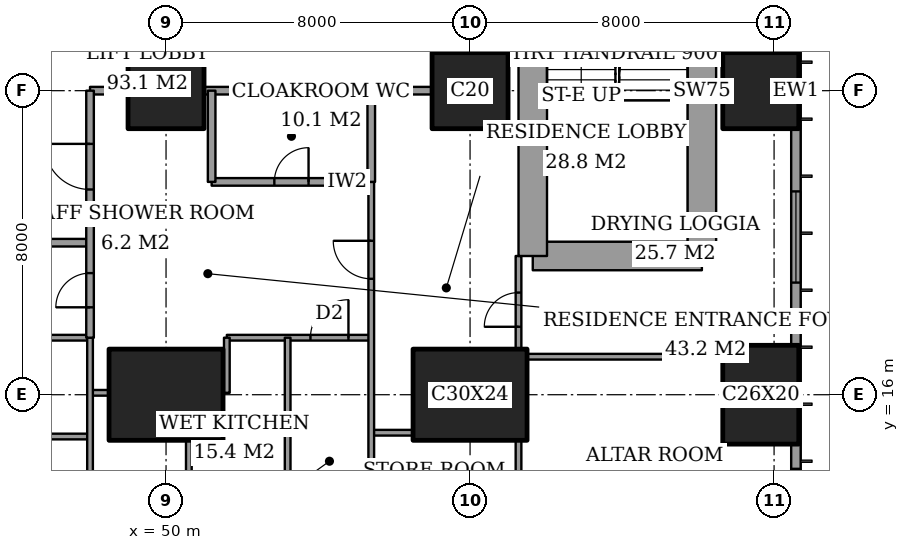
"""IFC4 building model, lengths in metres.
Left out: names, types, materials, properties, quantities, classifications, styles, units other than length and angle.
Written with IfcOpenShell. Run it as: python <this file> out.ifc"""

import sys

from ifc_helpers import new_model, si_unit, direction, frame, frame_2d, origin, origin_2d, place, context, subcontext, project, spatial, rectangle, extrude, element, fill, save


model = new_model("IFC4")
c1 = context("Model", 3, precision=1e-05, world=origin(), true_north=direction((0.0, 1.0)))
c2 = subcontext(c1, "Body", "Model", "MODEL_VIEW")
j1 = project(units=[si_unit("LENGTHUNIT", "METRE"), si_unit("PLANEANGLEUNIT", "RADIAN")], contexts=[c1])
p1 = place(None, origin())
s1 = spatial("IfcSite", under=j1, at=p1, CompositionType="ELEMENT")
p2 = place(p1, origin())
s2 = spatial("IfcBuilding", under=s1, at=p2, CompositionType="ELEMENT")
p3 = place(p2, frame((0.0, 0.0, 157.4)))
s3 = spatial("IfcBuildingStorey", under=s2, at=p3, CompositionType="ELEMENT", Elevation=157.4)
p4 = place(p3, frame((50.0, 16.0, 0.0), z_axis=(0.0, 0.0, 1.0), x_axis=(1.0, 0.0, 0.0)))
e1 = element("IfcColumn", 1, at=p4, inside=s3, PredefinedType="COLUMN", context=c2, shape_type="SweptSolid", body=[
    extrude(rectangle(XDim=3.0, YDim=2.4, at=origin_2d()), origin(), (0.0, 0.0, 1.0), 3.6),
])
p5 = place(p3, frame((50.0, 24.0, 0.0), z_axis=(0.0, 0.0, 1.0), x_axis=(1.0, 0.0, 0.0)))
e2 = element("IfcColumn", 2, at=p5, inside=s3, PredefinedType="COLUMN", context=c2, shape_type="SweptSolid", body=[
    extrude(rectangle(XDim=2.0, YDim=2.0, at=origin_2d()), origin(), (0.0, 0.0, 1.0), 3.6),
])
p6 = place(p3, frame((58.0, 16.0, 0.0), z_axis=(0.0, 0.0, 1.0), x_axis=(1.0, 0.0, 0.0)))
e3 = element("IfcColumn", 3, at=p6, inside=s3, PredefinedType="COLUMN", context=c2, shape_type="SweptSolid", body=[
    extrude(rectangle(XDim=3.0, YDim=2.4, at=origin_2d()), origin(), (0.0, 0.0, 1.0), 3.6),
])
p7 = place(p3, frame((58.0, 24.0, 0.0), z_axis=(0.0, 0.0, 1.0), x_axis=(1.0, 0.0, 0.0)))
e4 = element("IfcColumn", 4, at=p7, inside=s3, PredefinedType="COLUMN", context=c2, shape_type="SweptSolid", body=[
    extrude(rectangle(XDim=2.0, YDim=2.0, at=origin_2d()), origin(), (0.0, 0.0, 1.0), 3.6),
])
p8 = place(p3, frame((65.65, 16.0, 0.0), z_axis=(0.0, 0.0, 1.0), x_axis=(0.0, 1.0, 0.0)))
e5 = element("IfcColumn", 5, at=p8, inside=s3, PredefinedType="COLUMN", context=c2, shape_type="SweptSolid", body=[
    extrude(rectangle(XDim=2.6, YDim=2.0, at=origin_2d()), origin(), (0.0, 0.0, 1.0), 3.6),
])
p9 = place(p3, frame((65.65, 24.0, 0.0), z_axis=(0.0, 0.0, 1.0), x_axis=(1.0, 0.0, 0.0)))
e6 = element("IfcColumn", 6, at=p9, inside=s3, PredefinedType="COLUMN", context=c2, shape_type="SweptSolid", body=[
    extrude(rectangle(XDim=2.0, YDim=2.0, at=origin_2d()), origin(), (0.0, 0.0, 1.0), 3.6),
])
p10 = place(p3, frame((59.65, 19.65, 0.0), z_axis=(0.0, 0.0, 1.0), x_axis=(1.0, 0.0, 0.0)))
e7 = element("IfcWall", 7, at=p10, inside=s3, PredefinedType="SHEAR", context=c2, shape_type="SweptSolid", body=[
    extrude(rectangle(XDim=4.45, YDim=0.75, at=frame_2d((2.225, 0.0))), origin(), (0.0, 0.0, 1.0), 3.6),
])
p11 = place(p3, frame((64.1, 19.65, 0.0), z_axis=(0.0, 0.0, 1.0), x_axis=(0.0, 1.0, 0.0)))
e8 = element("IfcWall", 8, at=p11, inside=s3, PredefinedType="SHEAR", context=c2, shape_type="SweptSolid", body=[
    extrude(rectangle(XDim=8.7, YDim=0.75, at=frame_2d((4.35, 0.0))), origin(), (0.0, 0.0, 1.0), 3.6),
])
p12 = place(p3, frame((59.65, 28.35, 0.0), z_axis=(0.0, 0.0, 1.0), x_axis=(0.0, -1.0, 0.0)))
e9 = element("IfcWall", 9, at=p12, inside=s3, PredefinedType="SHEAR", context=c2, shape_type="SweptSolid", body=[
    extrude(rectangle(XDim=8.7, YDim=0.75, at=frame_2d((4.35, 0.0))), origin(), (0.0, 0.0, 1.0), 3.6),
])
p13 = place(p12, frame((0.975, 0.0, 0.0)))
e10 = element("IfcOpeningElement", 10, at=p13, cuts=e9, PredefinedType="OPENING", context=c2, shape_type="SweptSolid", body=[
    extrude(rectangle(XDim=1.0, YDim=2.1, at=frame_2d((0.5, 1.05))), frame((0.0, 0.385, 0.0), z_axis=(0.0, -1.0, 0.0), x_axis=(1.0, 0.0, 0.0)), (0.0, 0.0, 1.0), 0.77),
])
p14 = place(p3, frame((66.575, 3.175, 0.0), z_axis=(0.0, 0.0, 1.0), x_axis=(0.0, 1.0, 0.0)))
e11 = element("IfcWall", 11, at=p14, inside=s3, PredefinedType="SOLIDWALL", context=c2, shape_type="SweptSolid", body=[
    extrude(rectangle(XDim=41.65, YDim=0.25, at=frame_2d((20.825, 0.0))), origin(), (0.0, 0.0, 1.0), 3.6),
])
p15 = place(p14, frame((0.775, 0.0, 0.4)))
e12 = element("IfcOpeningElement", 12, at=p15, cuts=e11, PredefinedType="OPENING", context=c2, shape_type="SweptSolid", body=[
    extrude(rectangle(XDim=2.4, YDim=2.2, at=frame_2d((1.2, 1.1))), frame((0.0, 0.135, 0.0), z_axis=(0.0, -1.0, 0.0), x_axis=(1.0, 0.0, 0.0)), (0.0, 0.0, 1.0), 0.27),
])
p16 = place(p14, frame((6.225, 0.0, 0.4)))
e13 = element("IfcOpeningElement", 13, at=p16, cuts=e11, PredefinedType="OPENING", context=c2, shape_type="SweptSolid", body=[
    extrude(rectangle(XDim=1.2, YDim=2.2, at=frame_2d((0.6, 1.1))), frame((0.0, 0.135, 0.0), z_axis=(0.0, -1.0, 0.0), x_axis=(1.0, 0.0, 0.0)), (0.0, 0.0, 1.0), 0.27),
])
p17 = place(p14, frame((8.475, 0.0, 0.4)))
e14 = element("IfcOpeningElement", 14, at=p17, cuts=e11, PredefinedType="OPENING", context=c2, shape_type="SweptSolid", body=[
    extrude(rectangle(XDim=2.4, YDim=2.2, at=frame_2d((1.2, 1.1))), frame((0.0, 0.135, 0.0), z_axis=(0.0, -1.0, 0.0), x_axis=(1.0, 0.0, 0.0)), (0.0, 0.0, 1.0), 0.27),
])
p18 = place(p14, frame((15.775, 0.0, 0.4)))
e15 = element("IfcOpeningElement", 15, at=p18, cuts=e11, PredefinedType="OPENING", context=c2, shape_type="SweptSolid", body=[
    extrude(rectangle(XDim=2.4, YDim=2.2, at=frame_2d((1.2, 1.1))), frame((0.0, 0.135, 0.0), z_axis=(0.0, -1.0, 0.0), x_axis=(1.0, 0.0, 0.0)), (0.0, 0.0, 1.0), 0.27),
])
p19 = place(p14, frame((23.475, 0.0, 0.4)))
e16 = element("IfcOpeningElement", 16, at=p19, cuts=e11, PredefinedType="OPENING", context=c2, shape_type="SweptSolid", body=[
    extrude(rectangle(XDim=2.4, YDim=2.2, at=frame_2d((1.2, 1.1))), frame((0.0, 0.135, 0.0), z_axis=(0.0, -1.0, 0.0), x_axis=(1.0, 0.0, 0.0)), (0.0, 0.0, 1.0), 0.27),
])
p20 = place(p14, frame((30.975, 0.0, 0.4)))
e17 = element("IfcOpeningElement", 17, at=p20, cuts=e11, PredefinedType="OPENING", context=c2, shape_type="SweptSolid", body=[
    extrude(rectangle(XDim=2.4, YDim=2.2, at=frame_2d((1.2, 1.1))), frame((0.0, 0.135, 0.0), z_axis=(0.0, -1.0, 0.0), x_axis=(1.0, 0.0, 0.0)), (0.0, 0.0, 1.0), 0.27),
])
p21 = place(p14, frame((34.5, 0.0, 0.4)))
e18 = element("IfcOpeningElement", 18, at=p21, cuts=e11, PredefinedType="OPENING", context=c2, shape_type="SweptSolid", body=[
    extrude(rectangle(XDim=1.2, YDim=2.2, at=frame_2d((0.6, 1.1))), frame((0.0, 0.135, 0.0), z_axis=(0.0, -1.0, 0.0), x_axis=(1.0, 0.0, 0.0)), (0.0, 0.0, 1.0), 0.27),
])
p22 = place(p14, frame((38.475, 0.0, 0.4)))
e19 = element("IfcOpeningElement", 19, at=p22, cuts=e11, PredefinedType="OPENING", context=c2, shape_type="SweptSolid", body=[
    extrude(rectangle(XDim=2.4, YDim=2.2, at=frame_2d((1.2, 1.1))), frame((0.0, 0.135, 0.0), z_axis=(0.0, -1.0, 0.0), x_axis=(1.0, 0.0, 0.0)), (0.0, 0.0, 1.0), 0.27),
])
p23 = place(p3, frame((45.6, 14.9, 0.0), z_axis=(0.0, 0.0, 1.0), x_axis=(1.0, 0.0, 0.0)))
e20 = element("IfcWall", 20, at=p23, inside=s3, PredefinedType="PARTITIONING", context=c2, shape_type="SweptSolid", body=[
    extrude(rectangle(XDim=2.4, YDim=0.15, at=frame_2d((1.2, 0.0))), origin(), (0.0, 0.0, 1.0), 3.35),
])
p24 = place(p3, frame((55.4, 15.0, 0.0), z_axis=(0.0, 0.0, 1.0), x_axis=(1.0, 0.0, 0.0)))
e21 = element("IfcWall", 21, at=p24, inside=s3, PredefinedType="PARTITIONING", context=c2, shape_type="SweptSolid", body=[
    extrude(rectangle(XDim=1.1, YDim=0.15, at=frame_2d((0.55, 0.0))), origin(), (0.0, 0.0, 1.0), 3.35),
])
p25 = place(p3, frame((48.0, 16.05, 0.0), z_axis=(0.0, 0.0, 1.0), x_axis=(1.0, 0.0, 0.0)))
e22 = element("IfcWall", 22, at=p25, inside=s3, PredefinedType="PARTITIONING", context=c2, shape_type="SweptSolid", body=[
    extrude(rectangle(XDim=0.5, YDim=0.15, at=frame_2d((0.25, 0.0))), origin(), (0.0, 0.0, 1.0), 2.634),
])
p26 = place(p3, frame((59.5, 17.0, 0.0), z_axis=(0.0, 0.0, 1.0), x_axis=(1.0, 0.0, 0.0)))
e23 = element("IfcWall", 23, at=p26, inside=s3, PredefinedType="PARTITIONING", context=c2, shape_type="SweptSolid", body=[
    extrude(rectangle(XDim=5.15, YDim=0.15, at=frame_2d((2.575, 0.0))), origin(), (0.0, 0.0, 1.0), 3.35),
])
p27 = place(p3, frame((42.0, 17.5, 0.0), z_axis=(0.0, 0.0, 1.0), x_axis=(1.0, 0.0, 0.0)))
e24 = element("IfcWall", 24, at=p27, inside=s3, PredefinedType="PARTITIONING", context=c2, shape_type="SweptSolid", body=[
    extrude(rectangle(XDim=6.0, YDim=0.15, at=frame_2d((3.0, 0.0))), origin(), (0.0, 0.0, 1.0), 3.35),
])
p28 = place(p3, frame((51.6, 17.5, 0.0), z_axis=(0.0, 0.0, 1.0), x_axis=(1.0, 0.0, 0.0)))
e25 = element("IfcWall", 25, at=p28, inside=s3, PredefinedType="PARTITIONING", context=c2, shape_type="SweptSolid", body=[
    extrude(rectangle(XDim=3.8, YDim=0.15, at=frame_2d((1.9, 0.0))), origin(), (0.0, 0.0, 1.0), 3.35),
])
p29 = place(p28, frame((2.2, 0.0, 0.0)))
e26 = element("IfcOpeningElement", 26, at=p29, cuts=e25, PredefinedType="OPENING", context=c2, shape_type="SweptSolid", body=[
    extrude(rectangle(XDim=1.0, YDim=2.1, at=frame_2d((0.5, 1.05))), frame((0.0, 0.085, 0.0), z_axis=(0.0, -1.0, 0.0), x_axis=(1.0, 0.0, 0.0)), (0.0, 0.0, 1.0), 0.17),
])
p30 = place(p3, frame((42.0, 20.0, 0.0), z_axis=(0.0, 0.0, 1.0), x_axis=(1.0, 0.0, 0.0)))
e27 = element("IfcWall", 27, at=p30, inside=s3, PredefinedType="PARTITIONING", context=c2, shape_type="SweptSolid", body=[
    extrude(rectangle(XDim=6.0, YDim=0.2, at=frame_2d((3.0, 0.0))), origin(), (0.0, 0.0, 1.0), 3.35),
])
p31 = place(p3, frame((51.2, 21.6, 0.0), z_axis=(0.0, 0.0, 1.0), x_axis=(1.0, 0.0, 0.0)))
e28 = element("IfcWall", 28, at=p31, inside=s3, PredefinedType="PARTITIONING", context=c2, shape_type="SweptSolid", body=[
    extrude(rectangle(XDim=4.2, YDim=0.2, at=frame_2d((2.1, 0.0))), origin(), (0.0, 0.0, 1.0), 3.35),
])
p32 = place(p31, frame((1.65, 0.0, 0.0)))
e29 = element("IfcOpeningElement", 29, at=p32, cuts=e28, PredefinedType="OPENING", context=c2, shape_type="SweptSolid", body=[
    extrude(rectangle(XDim=0.9, YDim=2.1, at=frame_2d((0.45, 1.05))), frame((0.0, 0.11, 0.0), z_axis=(0.0, -1.0, 0.0), x_axis=(1.0, 0.0, 0.0)), (0.0, 0.0, 1.0), 0.22),
])
p33 = place(p3, frame((48.0, 24.0, 0.0), z_axis=(0.0, 0.0, 1.0), x_axis=(1.0, 0.0, 0.0)))
e30 = element("IfcWall", 30, at=p33, inside=s3, PredefinedType="PARTITIONING", context=c2, shape_type="SweptSolid", body=[
    extrude(rectangle(XDim=1.0, YDim=0.2, at=frame_2d((0.5, 0.0))), origin(), (0.0, 0.0, 1.0), 3.35),
])
p34 = place(p3, frame((51.0, 24.0, 0.0), z_axis=(0.0, 0.0, 1.0), x_axis=(1.0, 0.0, 0.0)))
e31 = element("IfcWall", 31, at=p34, inside=s3, PredefinedType="PARTITIONING", context=c2, shape_type="SweptSolid", body=[
    extrude(rectangle(XDim=6.0, YDim=0.2, at=frame_2d((3.0, 0.0))), origin(), (0.0, 0.0, 1.0), 3.35),
])
p35 = place(p3, frame((48.0, 17.5, 0.0), z_axis=(0.0, 0.0, 1.0), x_axis=(0.0, 1.0, 0.0)))
e32 = element("IfcWall", 32, at=p35, inside=s3, PredefinedType="PARTITIONING", context=c2, shape_type="SweptSolid", body=[
    extrude(rectangle(XDim=6.5, YDim=0.2, at=frame_2d((3.25, 0.0))), origin(), (0.0, 0.0, 1.0), 3.35),
])
p36 = place(p35, frame((3.9, 0.0, 0.0)))
e33 = element("IfcOpeningElement", 33, at=p36, cuts=e32, PredefinedType="OPENING", context=c2, shape_type="SweptSolid", body=[
    extrude(rectangle(XDim=1.2, YDim=2.4, at=frame_2d((0.6, 1.2))), frame((0.0, 0.11, 0.0), z_axis=(0.0, -1.0, 0.0), x_axis=(1.0, 0.0, 0.0)), (0.0, 0.0, 1.0), 0.22),
])
p37 = place(p35, frame((0.8, 0.0, 0.0)))
e34 = element("IfcOpeningElement", 34, at=p37, cuts=e32, PredefinedType="OPENING", context=c2, shape_type="SweptSolid", body=[
    extrude(rectangle(XDim=0.9, YDim=2.1, at=frame_2d((0.45, 1.05))), frame((0.0, 0.11, 0.0), z_axis=(0.0, -1.0, 0.0), x_axis=(1.0, 0.0, 0.0)), (0.0, 0.0, 1.0), 0.22),
])
p38 = place(p3, frame((48.0, 11.0, 0.0), z_axis=(0.0, 0.0, 1.0), x_axis=(0.0, 1.0, 0.0)))
e35 = element("IfcWall", 35, at=p38, inside=s3, PredefinedType="PARTITIONING", context=c2, shape_type="SweptSolid", body=[
    extrude(rectangle(XDim=6.5, YDim=0.15, at=frame_2d((3.25, 0.0))), origin(), (0.0, 0.0, 1.0), 3.35),
])
p39 = place(p3, frame((50.6, 11.0, 0.0), z_axis=(0.0, 0.0, 1.0), x_axis=(0.0, 1.0, 0.0)))
e36 = element("IfcWall", 36, at=p39, inside=s3, PredefinedType="PARTITIONING", context=c2, shape_type="SweptSolid", body=[
    extrude(rectangle(XDim=3.8, YDim=0.15, at=frame_2d((1.9, 0.0))), origin(), (0.0, 0.0, 1.0), 3.35),
])
p40 = place(p3, frame((51.2, 21.6, 0.0), z_axis=(0.0, 0.0, 1.0), x_axis=(0.0, 1.0, 0.0)))
e37 = element("IfcWall", 37, at=p40, inside=s3, PredefinedType="PARTITIONING", context=c2, shape_type="SweptSolid", body=[
    extrude(rectangle(XDim=2.4, YDim=0.2, at=frame_2d((1.2, 0.0))), origin(), (0.0, 0.0, 1.0), 3.35),
])
p41 = place(p3, frame((51.6, 16.05, 0.0), z_axis=(0.0, 0.0, 1.0), x_axis=(0.0, 1.0, 0.0)))
e38 = element("IfcWall", 38, at=p41, inside=s3, PredefinedType="PARTITIONING", context=c2, shape_type="SweptSolid", body=[
    extrude(rectangle(XDim=1.45, YDim=0.15, at=frame_2d((0.725, 0.0))), origin(), (0.0, 0.0, 1.0), 3.35),
])
p42 = place(p3, frame((53.2, 11.0, 0.0), z_axis=(0.0, 0.0, 1.0), x_axis=(0.0, 1.0, 0.0)))
e39 = element("IfcWall", 39, at=p42, inside=s3, PredefinedType="PARTITIONING", context=c2, shape_type="SweptSolid", body=[
    extrude(rectangle(XDim=6.5, YDim=0.15, at=frame_2d((3.25, 0.0))), origin(), (0.0, 0.0, 1.0), 3.35),
])
p43 = place(p3, frame((55.4, 21.6, 0.0), z_axis=(0.0, 0.0, 1.0), x_axis=(0.0, 1.0, 0.0)))
e40 = element("IfcWall", 40, at=p43, inside=s3, PredefinedType="PARTITIONING", context=c2, shape_type="SweptSolid", body=[
    extrude(rectangle(XDim=2.4, YDim=0.2, at=frame_2d((1.2, 0.0))), origin(), (0.0, 0.0, 1.0), 3.35),
])
p44 = place(p3, frame((55.4, 11.0, 0.0), z_axis=(0.0, 0.0, 1.0), x_axis=(0.0, 1.0, 0.0)))
e41 = element("IfcWall", 41, at=p44, inside=s3, PredefinedType="PARTITIONING", context=c2, shape_type="SweptSolid", body=[
    extrude(rectangle(XDim=10.6, YDim=0.15, at=frame_2d((5.3, 0.0))), origin(), (0.0, 0.0, 1.0), 3.35),
])
p45 = place(p44, frame((8.05, 0.0, 0.0)))
e42 = element("IfcOpeningElement", 42, at=p45, cuts=e41, PredefinedType="OPENING", context=c2, shape_type="SweptSolid", body=[
    extrude(rectangle(XDim=1.0, YDim=2.1, at=frame_2d((0.5, 1.05))), frame((0.0, 0.085, 0.0), z_axis=(0.0, -1.0, 0.0), x_axis=(1.0, 0.0, 0.0)), (0.0, 0.0, 1.0), 0.17),
])
p46 = place(p3, frame((59.275, 11.0, 0.0), z_axis=(0.0, 0.0, 1.0), x_axis=(0.0, 1.0, 0.0)))
e43 = element("IfcWall", 43, at=p46, inside=s3, PredefinedType="PARTITIONING", context=c2, shape_type="SweptSolid", body=[
    extrude(rectangle(XDim=3.8, YDim=0.15, at=frame_2d((1.9, 0.0))), origin(), (0.0, 0.0, 1.0), 3.35),
])
p47 = place(p3, frame((59.275, 17.2, 0.0), z_axis=(0.0, 0.0, 1.0), x_axis=(0.0, 1.0, 0.0)))
e44 = element("IfcWall", 44, at=p47, inside=s3, PredefinedType="PARTITIONING", context=c2, shape_type="SweptSolid", body=[
    extrude(rectangle(XDim=2.45, YDim=0.15, at=frame_2d((1.225, 0.0))), origin(), (0.0, 0.0, 1.0), 3.35),
])
p48 = place(p47, frame((0.587, 0.0, 0.0)))
e45 = element("IfcOpeningElement", 45, at=p48, cuts=e44, PredefinedType="OPENING", context=c2, shape_type="SweptSolid", body=[
    extrude(rectangle(XDim=0.9, YDim=2.1, at=frame_2d((0.45, 1.05))), frame((0.0, 0.085, 0.0), z_axis=(0.0, -1.0, 0.0), x_axis=(1.0, 0.0, 0.0)), (0.0, 0.0, 1.0), 0.17),
])
p49 = place(p17, origin())
e46 = element("IfcWindow", 46, at=p49, inside=s3, PartitioningType="SINGLE_PANEL", PredefinedType="WINDOW", context=c2, shape_type="SweptSolid", body=[
    extrude(rectangle(XDim=2.4, YDim=2.2, at=frame_2d((1.2, 1.1))), frame((0.0, 0.03, 0.0), z_axis=(0.0, -1.0, 0.0), x_axis=(1.0, 0.0, 0.0)), (0.0, 0.0, 1.0), 0.06),
])
fill(e14, e46)
p50 = place(p18, origin())
e47 = element("IfcWindow", 47, at=p50, inside=s3, PartitioningType="SINGLE_PANEL", PredefinedType="WINDOW", context=c2, shape_type="SweptSolid", body=[
    extrude(rectangle(XDim=2.4, YDim=2.2, at=frame_2d((1.2, 1.1))), frame((0.0, 0.03, 0.0), z_axis=(0.0, -1.0, 0.0), x_axis=(1.0, 0.0, 0.0)), (0.0, 0.0, 1.0), 0.06),
])
fill(e15, e47)
p51 = place(p48, origin())
e48 = element("IfcDoor", 48, at=p51, inside=s3, OperationType="SINGLE_SWING_RIGHT", PredefinedType="DOOR", context=c2, shape_type="SweptSolid", body=[
    extrude(rectangle(XDim=0.9, YDim=2.1, at=frame_2d((0.45, 1.05))), frame((0.0, 0.025, 0.0), z_axis=(0.0, -1.0, 0.0), x_axis=(1.0, 0.0, 0.0)), (0.0, 0.0, 1.0), 0.05),
])
fill(e45, e48)
p52 = place(p45, origin())
e49 = element("IfcDoor", 49, at=p52, inside=s3, OperationType="SINGLE_SWING_LEFT", PredefinedType="DOOR", context=c2, shape_type="SweptSolid", body=[
    extrude(rectangle(XDim=1.0, YDim=2.1, at=frame_2d((0.5, 1.05))), frame((0.0, 0.025, 0.0), z_axis=(0.0, -1.0, 0.0), x_axis=(1.0, 0.0, 0.0)), (0.0, 0.0, 1.0), 0.05),
])
fill(e42, e49)
p53 = place(p32, origin())
e50 = element("IfcDoor", 50, at=p53, inside=s3, OperationType="SINGLE_SWING_LEFT", PredefinedType="DOOR", context=c2, shape_type="SweptSolid", body=[
    extrude(rectangle(XDim=0.9, YDim=2.1, at=frame_2d((0.45, 1.05))), frame((0.0, 0.025, 0.0), z_axis=(0.0, -1.0, 0.0), x_axis=(1.0, 0.0, 0.0)), (0.0, 0.0, 1.0), 0.05),
])
fill(e29, e50)
p54 = place(p36, origin())
e51 = element("IfcDoor", 51, at=p54, inside=s3, OperationType="SINGLE_SWING_LEFT", PredefinedType="DOOR", context=c2, shape_type="SweptSolid", body=[
    extrude(rectangle(XDim=1.2, YDim=2.4, at=frame_2d((0.6, 1.2))), frame((0.0, 0.025, 0.0), z_axis=(0.0, -1.0, 0.0), x_axis=(1.0, 0.0, 0.0)), (0.0, 0.0, 1.0), 0.05),
])
fill(e33, e51)
p55 = place(p29, origin())
e52 = element("IfcDoor", 52, at=p55, inside=s3, OperationType="SINGLE_SWING_LEFT", PredefinedType="DOOR", context=c2, shape_type="SweptSolid", body=[
    extrude(rectangle(XDim=1.0, YDim=2.1, at=frame_2d((0.5, 1.05))), frame((0.0, 0.025, 0.0), z_axis=(0.0, -1.0, 0.0), x_axis=(1.0, 0.0, 0.0)), (0.0, 0.0, 1.0), 0.05),
])
fill(e26, e52)
p56 = place(p37, origin())
e53 = element("IfcDoor", 53, at=p56, inside=s3, OperationType="SINGLE_SWING_RIGHT", PredefinedType="DOOR", context=c2, shape_type="SweptSolid", body=[
    extrude(rectangle(XDim=0.9, YDim=2.1, at=frame_2d((0.45, 1.05))), frame((0.0, 0.025, 0.0), z_axis=(0.0, -1.0, 0.0), x_axis=(1.0, 0.0, 0.0)), (0.0, 0.0, 1.0), 0.05),
])
fill(e34, e53)
save(model, sys.argv[1])
